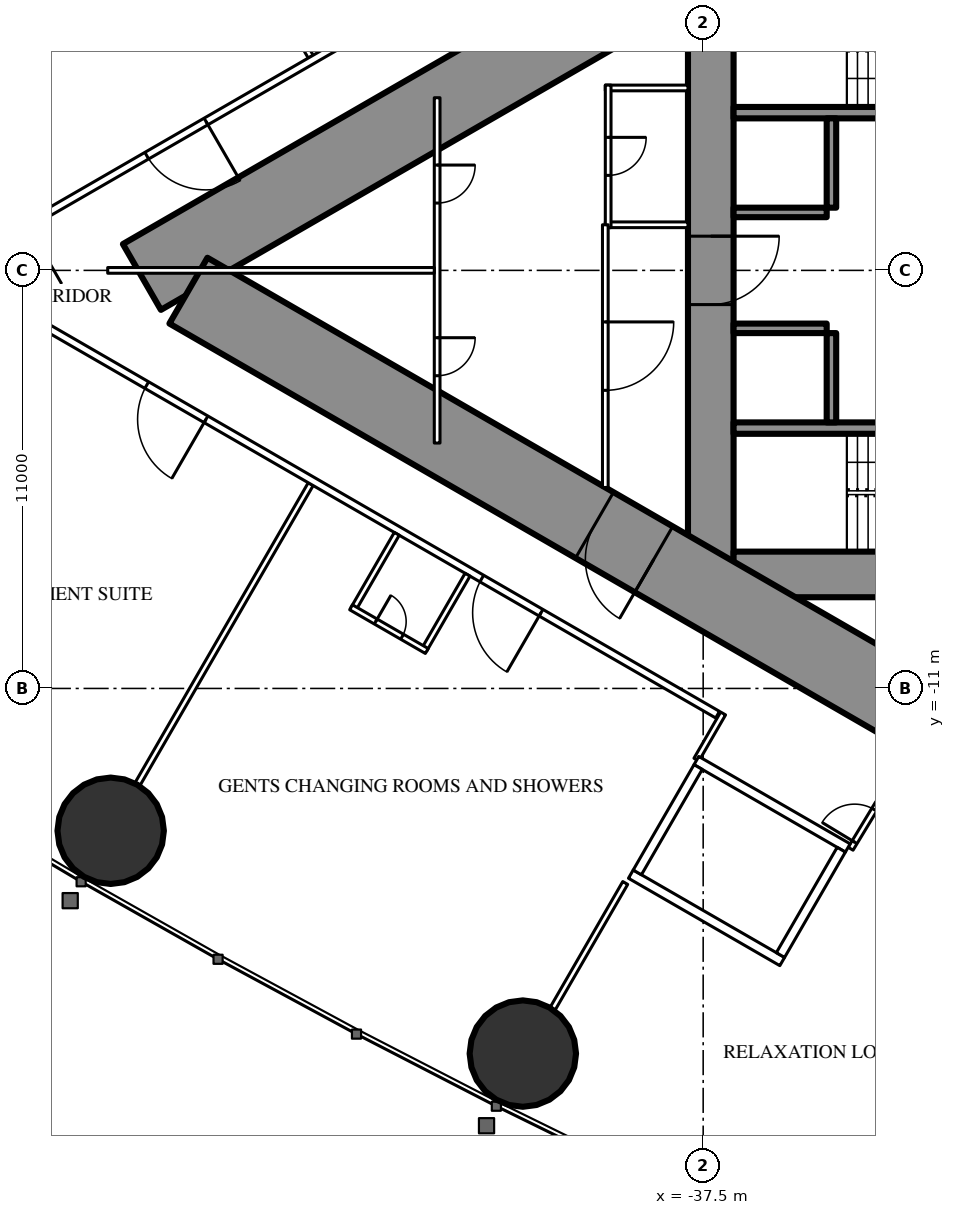
"""IFC4 building model, lengths in metres.
Left out: names, types, materials, properties, quantities, classifications, styles, units other than length and angle.
Written with IfcOpenShell. Run it as: python <this file> out.ifc"""

import sys

from ifc_helpers import new_model, si_unit, direction, frame, frame_2d, origin, origin_2d, place, context, subcontext, project, spatial, rectangle, hollow_circle, extrude, element, fill, save


model = new_model("IFC4")
c1 = context("Model", 3, precision=1e-05, world=origin(), true_north=direction((0.0, 1.0)))
c2 = subcontext(c1, "Body", "Model", "MODEL_VIEW")
j1 = project(units=[si_unit("LENGTHUNIT", "METRE"), si_unit("PLANEANGLEUNIT", "RADIAN")], contexts=[c1])
p1 = place(None, origin())
s1 = spatial("IfcSite", under=j1, at=p1, CompositionType="ELEMENT")
p2 = place(p1, origin())
s2 = spatial("IfcBuilding", under=s1, at=p2, CompositionType="ELEMENT")
p3 = place(p2, frame((0.0, 0.0, 12.6)))
s3 = spatial("IfcBuildingStorey", under=s2, at=p3, CompositionType="ELEMENT", Elevation=12.6)
for number, where, z_axis, x_axis in (
    (1, (-53.09, -14.745, 0.0), (0.0, 0.0, 1.0), (1.0, 0.0, 0.0)),
    (2, (-42.245, -20.607, 0.0), (0.0, 0.0, 1.0), (1.0, 0.0, 0.0)),
):
    element("IfcColumn", number, at=place(p3, frame(where, z_axis=z_axis, x_axis=x_axis)), inside=s3, PredefinedType="COLUMN", context=c2, shape_type="SweptSolid", body=[
        extrude(hollow_circle(Radius=1.4, WallThickness=0.12, at=origin_2d()), origin(), (0.0, 0.0, 1.0), 5.4),
    ])
p4 = place(p3, frame((-37.3, 8.6, 0.0), z_axis=(0.0, 0.0, 1.0), x_axis=(0.0, -1.0, 0.0)))
e3 = element("IfcWall", 3, at=p4, inside=s3, PredefinedType="SHEAR", context=c2, shape_type="SweptSolid", body=[
    extrude(rectangle(XDim=17.2, YDim=1.2, at=frame_2d((8.6, 0.0))), origin(), (0.0, 0.0, 1.0), 5.4),
])
p5 = place(p4, frame((7.7, 0.0, 0.0)))
e4 = element("IfcOpeningElement", 4, at=p5, cuts=e3, PredefinedType="OPENING", context=c2, shape_type="SweptSolid", body=[
    extrude(rectangle(XDim=1.8, YDim=2.2, at=frame_2d((0.9, 1.1))), frame((0.0, 0.61, 0.0), z_axis=(0.0, -1.0, 0.0), x_axis=(1.0, 0.0, 0.0)), (0.0, 0.0, 1.0), 1.22),
])
p6 = place(p3, frame((-28.3, -8.0, 0.0), z_axis=(0.0, 0.0, 1.0), x_axis=(-1.0, 0.0, 0.0)))
e5 = element("IfcWall", 5, at=p6, inside=s3, PredefinedType="SHEAR", context=c2, shape_type="SweptSolid", body=[
    extrude(rectangle(XDim=8.4, YDim=1.2, at=frame_2d((4.2, 0.0))), origin(), (0.0, 0.0, 1.0), 5.4),
])
p7 = place(p6, frame((0.25, 0.0, 0.0)))
e6 = element("IfcOpeningElement", 6, at=p7, cuts=e5, PredefinedType="OPENING", context=c2, shape_type="SweptSolid", body=[
    extrude(rectangle(XDim=1.0, YDim=2.2, at=frame_2d((0.5, 1.1))), frame((0.0, 0.61, 0.0), z_axis=(0.0, -1.0, 0.0), x_axis=(1.0, 0.0, 0.0)), (0.0, 0.0, 1.0), 1.22),
])
for number, where, z_axis, x_axis in (
    (7, (-28.3, 4.15, 0.0), (0.0, 0.0, 1.0), (-1.0, 0.0, 0.0)),
    (8, (-28.3, -4.15, 0.0), (0.0, 0.0, 1.0), (-1.0, 0.0, 0.0)),
):
    element("IfcWall", number, at=place(p3, frame(where, z_axis=z_axis, x_axis=x_axis)), inside=s3, PredefinedType="SHEAR", context=c2, shape_type="SweptSolid", body=[
        extrude(rectangle(XDim=8.4, YDim=0.3, at=frame_2d((4.2, 0.0))), origin(), (0.0, 0.0, 1.0), 5.4),
    ])
p8 = place(p3, frame((-34.125, 4.0, 0.0), z_axis=(0.0, 0.0, 1.0), x_axis=(0.0, -1.0, 0.0)))
e9 = element("IfcWall", 9, at=p8, inside=s3, PredefinedType="SHEAR", context=c2, shape_type="SweptSolid", body=[
    extrude(rectangle(XDim=2.35, YDim=0.25, at=frame_2d((1.175, 0.0))), origin(), (0.0, 0.0, 1.0), 5.4),
])
p9 = place(p3, frame((-34.25, 1.525, 0.0), z_axis=(0.0, 0.0, 1.0), x_axis=(-1.0, 0.0, 0.0)))
e10 = element("IfcWall", 10, at=p9, inside=s3, PredefinedType="SHEAR", context=c2, shape_type="SweptSolid", body=[
    extrude(rectangle(XDim=2.45, YDim=0.25, at=frame_2d((1.225, 0.0))), origin(), (0.0, 0.0, 1.0), 5.4),
])
p10 = place(p3, frame((-34.125, -1.65, 0.0), z_axis=(0.0, 0.0, 1.0), x_axis=(0.0, -1.0, 0.0)))
e11 = element("IfcWall", 11, at=p10, inside=s3, PredefinedType="SHEAR", context=c2, shape_type="SweptSolid", body=[
    extrude(rectangle(XDim=2.35, YDim=0.25, at=frame_2d((1.175, 0.0))), origin(), (0.0, 0.0, 1.0), 5.4),
])
p11 = place(p3, frame((-34.25, -1.525, 0.0), z_axis=(0.0, 0.0, 1.0), x_axis=(-1.0, 0.0, 0.0)))
e12 = element("IfcWall", 12, at=p11, inside=s3, PredefinedType="SHEAR", context=c2, shape_type="SweptSolid", body=[
    extrude(rectangle(XDim=2.45, YDim=0.25, at=frame_2d((1.225, 0.0))), origin(), (0.0, 0.0, 1.0), 5.4),
])
p12 = place(p3, frame((-27.2, 14.3, 0.0), z_axis=(0.0, 0.0, 1.0), x_axis=(-0.866026593062, -0.499997940104, 0.0)))
e13 = element("IfcWall", 13, at=p12, inside=s3, PredefinedType="SHEAR", context=c2, shape_type="SweptSolid", body=[
    extrude(rectangle(XDim=28.946, YDim=2.0, at=frame_2d((14.473, 0.0))), origin(), (0.0, 0.0, 1.0), 5.4),
])
p13 = place(p12, frame((4.6, 0.0, 0.0)))
e14 = element("IfcOpeningElement", 14, at=p13, cuts=e13, PredefinedType="OPENING", context=c2, shape_type="SweptSolid", body=[
    extrude(rectangle(XDim=1.0, YDim=2.2, at=frame_2d((0.5, 1.1))), frame((0.0, 1.01, 0.0), z_axis=(0.0, -1.0, 0.0), x_axis=(1.0, 0.0, 0.0)), (0.0, 0.0, 1.0), 2.02),
])
p14 = place(p12, frame((13.395, 0.0, 0.0)))
e15 = element("IfcOpeningElement", 15, at=p14, cuts=e13, PredefinedType="OPENING", context=c2, shape_type="SweptSolid", body=[
    extrude(rectangle(XDim=1.8, YDim=2.2, at=frame_2d((0.9, 1.1))), frame((0.0, 1.01, 0.0), z_axis=(0.0, -1.0, 0.0), x_axis=(1.0, 0.0, 0.0)), (0.0, 0.0, 1.0), 2.02),
])
p15 = place(p3, frame((-27.2, -14.3, 0.0), z_axis=(0.0, 0.0, 1.0), x_axis=(-0.866024044937, 0.500002353585, 0.0)))
e16 = element("IfcWall", 16, at=p15, inside=s3, PredefinedType="SHEAR", context=c2, shape_type="SweptSolid", body=[
    extrude(rectangle(XDim=27.533, YDim=2.0, at=frame_2d((13.767, 0.0))), origin(), (0.0, 0.0, 1.0), 5.4),
])
p16 = place(p15, frame((4.6, 0.0, 0.0)))
e17 = element("IfcOpeningElement", 17, at=p16, cuts=e16, PredefinedType="OPENING", context=c2, shape_type="SweptSolid", body=[
    extrude(rectangle(XDim=1.0, YDim=2.2, at=frame_2d((0.5, 1.1))), frame((0.0, 1.01, 0.0), z_axis=(0.0, -1.0, 0.0), x_axis=(1.0, 0.0, 0.0)), (0.0, 0.0, 1.0), 2.02),
])
p17 = place(p15, frame((13.395, 0.0, 0.0)))
e18 = element("IfcOpeningElement", 18, at=p17, cuts=e16, PredefinedType="OPENING", context=c2, shape_type="SweptSolid", body=[
    extrude(rectangle(XDim=1.8, YDim=2.2, at=frame_2d((0.9, 1.1))), frame((0.0, 1.01, 0.0), z_axis=(0.0, -1.0, 0.0), x_axis=(1.0, 0.0, 0.0)), (0.0, 0.0, 1.0), 2.02),
])
for number, where, z_axis, x_axis in (
    (19, (-47.827, 5.624, 0.0), (0.0, 0.0, 1.0), (-0.5, 0.866, 0.0)),
    (20, (-47.827, -5.624, 0.0), (0.0, 0.0, 1.0), (-0.5, -0.866, 0.0)),
):
    element("IfcWall", number, at=place(p3, frame(where, z_axis=z_axis, x_axis=x_axis)), inside=s3, PredefinedType="PARTITIONING", context=c2, shape_type="SweptSolid", body=[
        extrude(rectangle(XDim=9.11, YDim=0.15, at=frame_2d((4.555, 0.0))), origin(), (0.0, 0.0, 1.0), 4.15),
    ])
p18 = place(p3, frame((-39.551, -16.118, 0.0), z_axis=(0.0, 0.0, 1.0), x_axis=(-0.499986503906, -0.866033195618, 0.0)))
e21 = element("IfcWall", 21, at=p18, inside=s3, PredefinedType="PARTITIONING", context=c2, shape_type="SweptSolid", body=[
    extrude(rectangle(XDim=3.815, YDim=0.15, at=frame_2d((1.907, 0.0))), origin(), (0.0, 0.0, 1.0), 5.15),
])
p19 = place(p3, frame((-37.9, 11.24, 0.0), z_axis=(0.0, 0.0, 1.0), x_axis=(-0.866022995118, -0.50000417191, 0.0)))
e22 = element("IfcWall", 22, at=p19, inside=s3, PredefinedType="PARTITIONING", context=c2, shape_type="SweptSolid", body=[
    extrude(rectangle(XDim=22.48, YDim=0.2, at=frame_2d((11.24, 0.0))), origin(), (0.0, 0.0, 1.0), 4.25),
])
p20 = place(p19, frame((14.644, 0.0, 0.0)))
e23 = element("IfcOpeningElement", 23, at=p20, cuts=e22, PredefinedType="OPENING", context=c2, shape_type="SweptSolid", body=[
    extrude(rectangle(XDim=1.8, YDim=2.2, at=frame_2d((0.9, 1.1))), frame((0.0, 0.11, 0.0), z_axis=(0.0, -1.0, 0.0), x_axis=(1.0, 0.0, 0.0)), (0.0, 0.0, 1.0), 0.22),
])
p21 = place(p19, frame((20.069, 0.0, 0.0)))
e24 = element("IfcOpeningElement", 24, at=p21, cuts=e22, PredefinedType="OPENING", context=c2, shape_type="SweptSolid", body=[
    extrude(rectangle(XDim=1.8, YDim=2.2, at=frame_2d((0.9, 1.1))), frame((0.0, 0.11, 0.0), z_axis=(0.0, -1.0, 0.0), x_axis=(1.0, 0.0, 0.0)), (0.0, 0.0, 1.0), 0.22),
])
p22 = place(p19, frame((4.915, 0.0, 0.0)))
e25 = element("IfcOpeningElement", 25, at=p22, cuts=e22, PredefinedType="OPENING", context=c2, shape_type="SweptSolid", body=[
    extrude(rectangle(XDim=1.8, YDim=2.2, at=frame_2d((0.9, 1.1))), frame((0.0, 0.11, 0.0), z_axis=(0.0, -1.0, 0.0), x_axis=(1.0, 0.0, 0.0)), (0.0, 0.0, 1.0), 0.22),
])
p23 = place(p3, frame((-27.5, -17.244, 0.0), z_axis=(0.0, 0.0, 1.0), x_axis=(-0.866027347857, 0.499996632752, 0.0)))
e26 = element("IfcWall", 26, at=p23, inside=s3, PredefinedType="PARTITIONING", context=c2, shape_type="SweptSolid", body=[
    extrude(rectangle(XDim=6.269, YDim=0.2, at=frame_2d((3.135, 0.0))), origin(), (0.0, 0.0, 1.0), 4.25),
])
p24 = place(p3, frame((-37.12, -11.69, 0.0), z_axis=(0.0, 0.0, 1.0), x_axis=(-0.866028803602, 0.499994111297, 0.0)))
e27 = element("IfcWall", 27, at=p24, inside=s3, PredefinedType="PARTITIONING", context=c2, shape_type="SweptSolid", body=[
    extrude(rectangle(XDim=23.26, YDim=0.2, at=frame_2d((11.63, 0.0))), origin(), (0.0, 0.0, 1.0), 4.25),
])
p25 = place(p24, frame((20.909, 0.0, 0.0)))
e28 = element("IfcOpeningElement", 28, at=p25, cuts=e27, PredefinedType="OPENING", context=c2, shape_type="SweptSolid", body=[
    extrude(rectangle(XDim=1.8, YDim=2.2, at=frame_2d((0.9, 1.1))), frame((0.0, 0.11, 0.0), z_axis=(0.0, -1.0, 0.0), x_axis=(1.0, 0.0, 0.0)), (0.0, 0.0, 1.0), 0.22),
])
p26 = place(p24, frame((15.544, 0.0, 0.0)))
e29 = element("IfcOpeningElement", 29, at=p26, cuts=e27, PredefinedType="OPENING", context=c2, shape_type="SweptSolid", body=[
    extrude(rectangle(XDim=1.8, YDim=2.2, at=frame_2d((0.9, 1.1))), frame((0.0, 0.11, 0.0), z_axis=(0.0, -1.0, 0.0), x_axis=(1.0, 0.0, 0.0)), (0.0, 0.0, 1.0), 0.22),
])
p27 = place(p24, frame((5.365, 0.0, 0.0)))
e30 = element("IfcOpeningElement", 30, at=p27, cuts=e27, PredefinedType="OPENING", context=c2, shape_type="SweptSolid", body=[
    extrude(rectangle(XDim=1.8, YDim=2.2, at=frame_2d((0.9, 1.1))), frame((0.0, 0.11, 0.0), z_axis=(0.0, -1.0, 0.0), x_axis=(1.0, 0.0, 0.0)), (0.0, 0.0, 1.0), 0.22),
])
p28 = place(p3, frame((-36.976, -11.658, 0.0), z_axis=(0.0, 0.0, 1.0), x_axis=(-0.50008355685, -0.86597715684, 0.0)))
e31 = element("IfcWall", 31, at=p28, inside=s3, PredefinedType="PARTITIONING", context=c2, shape_type="SweptSolid", body=[
    extrude(rectangle(XDim=1.405, YDim=0.15, at=frame_2d((0.702, 0.0))), origin(), (0.0, 0.0, 1.0), 5.15),
])
p29 = place(p3, frame((-33.621, -15.218, 0.0), z_axis=(0.0, 0.0, 1.0), x_axis=(0.518424923641, 0.855123148177, 0.0)))
e32 = element("IfcWall", 32, at=p29, inside=s3, PredefinedType="PARTITIONING", context=c2, shape_type="SweptSolid", body=[
    extrude(rectangle(XDim=1.405, YDim=0.15, at=frame_2d((0.703, 0.0))), origin(), (0.0, 0.0, 1.0), 5.15),
])
p30 = place(p29, frame((0.203, 0.0, 0.0)))
e33 = element("IfcOpeningElement", 33, at=p30, cuts=e32, PredefinedType="OPENING", context=c2, shape_type="SweptSolid", body=[
    extrude(rectangle(XDim=1.0, YDim=2.2, at=frame_2d((0.5, 1.1))), frame((0.0, 0.085, 0.0), z_axis=(0.0, -1.0, 0.0), x_axis=(1.0, 0.0, 0.0)), (0.0, 0.0, 1.0), 0.17),
])
for number, where, z_axis, x_axis in (
    (34, (-37.9, 1.2, 0.0), (0.0, 0.0, 1.0), (-1.0, 0.0, 0.0)),
    (35, (-37.9, 4.8, 0.0), (0.0, 0.0, 1.0), (-1.0, 0.0, 0.0)),
):
    element("IfcWall", number, at=place(p3, frame(where, z_axis=z_axis, x_axis=x_axis)), inside=s3, PredefinedType="PARTITIONING", context=c2, shape_type="SweptSolid", body=[
        extrude(rectangle(XDim=2.175, YDim=0.15, at=frame_2d((1.087, 0.0))), origin(), (0.0, 0.0, 1.0), 5.15),
    ])
p31 = place(p3, frame((-40.0, 4.875, 0.0), z_axis=(0.0, 0.0, 1.0), x_axis=(0.0, -1.0, 0.0)))
e36 = element("IfcWall", 36, at=p31, inside=s3, PredefinedType="PARTITIONING", context=c2, shape_type="SweptSolid", body=[
    extrude(rectangle(XDim=3.75, YDim=0.15, at=frame_2d((1.875, 0.0))), origin(), (0.0, 0.0, 1.0), 5.15),
])
p32 = place(p31, frame((1.375, 0.0, 0.0)))
e37 = element("IfcOpeningElement", 37, at=p32, cuts=e36, PredefinedType="OPENING", context=c2, shape_type="SweptSolid", body=[
    extrude(rectangle(XDim=1.0, YDim=2.2, at=frame_2d((0.5, 1.1))), frame((0.0, 0.085, 0.0), z_axis=(0.0, -1.0, 0.0), x_axis=(1.0, 0.0, 0.0)), (0.0, 0.0, 1.0), 0.17),
])
p33 = place(p3, frame((-40.075, 1.2, 0.0), z_axis=(0.0, 0.0, 1.0), x_axis=(0.0, -1.0, 0.0)))
e38 = element("IfcWall", 38, at=p33, inside=s3, PredefinedType="PARTITIONING", context=c2, shape_type="SweptSolid", body=[
    extrude(rectangle(XDim=6.912, YDim=0.15, at=frame_2d((3.456, 0.0))), origin(), (0.0, 0.0, 1.0), 5.15),
])
p34 = place(p33, frame((2.556, 0.0, 0.0)))
e39 = element("IfcOpeningElement", 39, at=p34, cuts=e38, PredefinedType="OPENING", context=c2, shape_type="SweptSolid", body=[
    extrude(rectangle(XDim=1.8, YDim=2.2, at=frame_2d((0.9, 1.1))), frame((0.0, 0.085, 0.0), z_axis=(0.0, -1.0, 0.0), x_axis=(1.0, 0.0, 0.0)), (0.0, 0.0, 1.0), 0.17),
])
p35 = place(p3, frame((-44.5, 4.543, 0.0), z_axis=(0.0, 0.0, 1.0), x_axis=(0.0, -1.0, 0.0)))
e40 = element("IfcWall", 40, at=p35, inside=s3, PredefinedType="PARTITIONING", context=c2, shape_type="SweptSolid", body=[
    extrude(rectangle(XDim=9.085, YDim=0.15, at=frame_2d((4.543, 0.0))), origin(), (0.0, 0.0, 1.0), 5.15),
])
p36 = place(p35, frame((1.771, 0.0, 0.0)))
e41 = element("IfcOpeningElement", 41, at=p36, cuts=e40, PredefinedType="OPENING", context=c2, shape_type="SweptSolid", body=[
    extrude(rectangle(XDim=1.0, YDim=2.2, at=frame_2d((0.5, 1.1))), frame((0.0, 0.085, 0.0), z_axis=(0.0, -1.0, 0.0), x_axis=(1.0, 0.0, 0.0)), (0.0, 0.0, 1.0), 0.17),
])
p37 = place(p35, frame((6.314, 0.0, 0.0)))
e42 = element("IfcOpeningElement", 42, at=p37, cuts=e40, PredefinedType="OPENING", context=c2, shape_type="SweptSolid", body=[
    extrude(rectangle(XDim=1.0, YDim=2.2, at=frame_2d((0.5, 1.1))), frame((0.0, 0.085, 0.0), z_axis=(0.0, -1.0, 0.0), x_axis=(1.0, 0.0, 0.0)), (0.0, 0.0, 1.0), 0.17),
])
p38 = place(p3, frame((-44.575, 0.0, 0.0), z_axis=(0.0, 0.0, 1.0), x_axis=(-1.0, 0.0, 0.0)))
e43 = element("IfcWall", 43, at=p38, inside=s3, PredefinedType="PARTITIONING", context=c2, shape_type="SweptSolid", body=[
    extrude(rectangle(XDim=8.593, YDim=0.15, at=frame_2d((4.297, 0.0))), origin(), (0.0, 0.0, 1.0), 4.15),
])
for number, where, z_axis, x_axis in (
    (44, (-43.7, -8.007, 0.0), (0.0, 0.0, 1.0), (-0.5, -0.866, 0.0)),
    (45, (-45.562, -6.932, 0.0), (0.0, 0.0, 1.0), (-0.5, -0.866, 0.0)),
):
    element("IfcWall", number, at=place(p3, frame(where, z_axis=z_axis, x_axis=x_axis)), inside=s3, PredefinedType="PARTITIONING", context=c2, shape_type="SweptSolid", body=[
        extrude(rectangle(XDim=2.275, YDim=0.15, at=frame_2d((1.137, 0.0))), origin(), (0.0, 0.0, 1.0), 5.15),
    ])
p39 = place(p3, frame((-44.773, -10.014, 0.0), z_axis=(0.0, 0.0, 1.0), x_axis=(-0.86602648383, 0.499998129301, 0.0)))
e46 = element("IfcWall", 46, at=p39, inside=s3, PredefinedType="PARTITIONING", context=c2, shape_type="SweptSolid", body=[
    extrude(rectangle(XDim=2.3, YDim=0.15, at=frame_2d((1.15, 0.0))), origin(), (0.0, 0.0, 1.0), 5.15),
])
p40 = place(p39, frame((0.75, 0.0, 0.0)))
e47 = element("IfcOpeningElement", 47, at=p40, cuts=e46, PredefinedType="OPENING", context=c2, shape_type="SweptSolid", body=[
    extrude(rectangle(XDim=0.8, YDim=2.2, at=frame_2d((0.4, 1.1))), frame((0.0, 0.085, 0.0), z_axis=(0.0, -1.0, 0.0), x_axis=(1.0, 0.0, 0.0)), (0.0, 0.0, 1.0), 0.17),
])
p41 = place(p3, frame((-33.696, -15.197, 0.0), z_axis=(0.0, 0.0, 1.0), x_axis=(-0.865976953817, 0.500083908417, 0.0)))
e48 = element("IfcWall", 48, at=p41, inside=s3, PredefinedType="PARTITIONING", context=c2, shape_type="SweptSolid", body=[
    extrude(rectangle(XDim=4.599, YDim=0.25, at=frame_2d((2.3, 0.0))), origin(), (0.0, 0.0, 1.0), 5.15),
])
p42 = place(p3, frame((-35.42, -18.186, 0.0), z_axis=(0.0, 0.0, 1.0), x_axis=(-0.865990227814, 0.50006092162, 0.0)))
e49 = element("IfcWall", 49, at=p42, inside=s3, PredefinedType="PARTITIONING", context=c2, shape_type="SweptSolid", body=[
    extrude(rectangle(XDim=4.6, YDim=0.25, at=frame_2d((2.3, 0.0))), origin(), (0.0, 0.0, 1.0), 5.15),
])
p43 = place(p3, frame((-33.866, -15.243, 0.0), z_axis=(0.0, 0.0, 1.0), x_axis=(-0.499929347863, -0.866066190972, 0.0)))
e50 = element("IfcWall", 50, at=p43, inside=s3, PredefinedType="PARTITIONING", context=c2, shape_type="SweptSolid", body=[
    extrude(rectangle(XDim=3.201, YDim=0.25, at=frame_2d((1.6, 0.0))), origin(), (0.0, 0.0, 1.0), 5.15),
])
p44 = place(p3, frame((-37.633, -13.068, 0.0), z_axis=(0.0, 0.0, 1.0), x_axis=(-0.499872130319, -0.866099216793, 0.0)))
e51 = element("IfcWall", 51, at=p44, inside=s3, PredefinedType="PARTITIONING", context=c2, shape_type="SweptSolid", body=[
    extrude(rectangle(XDim=3.2, YDim=0.25, at=frame_2d((1.6, 0.0))), origin(), (0.0, 0.0, 1.0), 5.15),
])
p45 = place(p20, origin())
e52 = element("IfcDoor", 52, at=p45, inside=s3, OperationType="DOUBLE_DOOR_SINGLE_SWING", PredefinedType="DOOR", context=c2, shape_type="SweptSolid", body=[
    extrude(rectangle(XDim=1.8, YDim=2.2, at=frame_2d((0.9, 1.1))), frame((0.0, 0.025, 0.0), z_axis=(0.0, -1.0, 0.0), x_axis=(1.0, 0.0, 0.0)), (0.0, 0.0, 1.0), 0.05),
])
fill(e23, e52)
p46 = place(p26, origin())
e53 = element("IfcDoor", 53, at=p46, inside=s3, OperationType="DOUBLE_DOOR_SINGLE_SWING", PredefinedType="DOOR", context=c2, shape_type="SweptSolid", body=[
    extrude(rectangle(XDim=1.8, YDim=2.2, at=frame_2d((0.9, 1.1))), frame((0.0, 0.025, 0.0), z_axis=(0.0, -1.0, 0.0), x_axis=(1.0, 0.0, 0.0)), (0.0, 0.0, 1.0), 0.05),
])
fill(e29, e53)
p47 = place(p27, origin())
e54 = element("IfcDoor", 54, at=p47, inside=s3, OperationType="DOUBLE_DOOR_SINGLE_SWING", PredefinedType="DOOR", context=c2, shape_type="SweptSolid", body=[
    extrude(rectangle(XDim=1.8, YDim=2.2, at=frame_2d((0.9, 1.1))), frame((0.0, 0.025, 0.0), z_axis=(0.0, -1.0, 0.0), x_axis=(1.0, 0.0, 0.0)), (0.0, 0.0, 1.0), 0.05),
])
fill(e30, e54)
p48 = place(p30, origin())
e55 = element("IfcDoor", 55, at=p48, inside=s3, OperationType="SINGLE_SWING_LEFT", PredefinedType="DOOR", context=c2, shape_type="SweptSolid", body=[
    extrude(rectangle(XDim=1.0, YDim=2.2, at=frame_2d((0.5, 1.1))), frame((0.0, 0.025, 0.0), z_axis=(0.0, -1.0, 0.0), x_axis=(1.0, 0.0, 0.0)), (0.0, 0.0, 1.0), 0.05),
])
fill(e33, e55)
p49 = place(p32, origin())
e56 = element("IfcDoor", 56, at=p49, inside=s3, OperationType="SINGLE_SWING_LEFT", PredefinedType="DOOR", context=c2, shape_type="SweptSolid", body=[
    extrude(rectangle(XDim=1.0, YDim=2.2, at=frame_2d((0.5, 1.1))), frame((0.0, 0.025, 0.0), z_axis=(0.0, -1.0, 0.0), x_axis=(1.0, 0.0, 0.0)), (0.0, 0.0, 1.0), 0.05),
])
fill(e37, e56)
p50 = place(p34, origin())
e57 = element("IfcDoor", 57, at=p50, inside=s3, OperationType="DOUBLE_DOOR_SINGLE_SWING", PredefinedType="DOOR", context=c2, shape_type="SweptSolid", body=[
    extrude(rectangle(XDim=1.8, YDim=2.2, at=frame_2d((0.9, 1.1))), frame((0.0, 0.025, 0.0), z_axis=(0.0, -1.0, 0.0), x_axis=(1.0, 0.0, 0.0)), (0.0, 0.0, 1.0), 0.05),
])
fill(e39, e57)
p51 = place(p36, origin())
e58 = element("IfcDoor", 58, at=p51, inside=s3, OperationType="SINGLE_SWING_LEFT", PredefinedType="DOOR", context=c2, shape_type="SweptSolid", body=[
    extrude(rectangle(XDim=1.0, YDim=2.2, at=frame_2d((0.5, 1.1))), frame((0.0, 0.025, 0.0), z_axis=(0.0, -1.0, 0.0), x_axis=(1.0, 0.0, 0.0)), (0.0, 0.0, 1.0), 0.05),
])
fill(e41, e58)
p52 = place(p37, origin())
e59 = element("IfcDoor", 59, at=p52, inside=s3, OperationType="SINGLE_SWING_LEFT", PredefinedType="DOOR", context=c2, shape_type="SweptSolid", body=[
    extrude(rectangle(XDim=1.0, YDim=2.2, at=frame_2d((0.5, 1.1))), frame((0.0, 0.025, 0.0), z_axis=(0.0, -1.0, 0.0), x_axis=(1.0, 0.0, 0.0)), (0.0, 0.0, 1.0), 0.05),
])
fill(e42, e59)
p53 = place(p17, origin())
e60 = element("IfcDoor", 60, at=p53, inside=s3, OperationType="DOUBLE_DOOR_SINGLE_SWING", PredefinedType="DOOR", context=c2, shape_type="SweptSolid", body=[
    extrude(rectangle(XDim=1.8, YDim=2.2, at=frame_2d((0.9, 1.1))), frame((0.0, 0.025, 0.0), z_axis=(0.0, -1.0, 0.0), x_axis=(1.0, 0.0, 0.0)), (0.0, 0.0, 1.0), 0.05),
])
fill(e18, e60)
p54 = place(p5, origin())
e61 = element("IfcDoor", 61, at=p54, inside=s3, OperationType="DOUBLE_DOOR_SINGLE_SWING", PredefinedType="DOOR", context=c2, shape_type="SweptSolid", body=[
    extrude(rectangle(XDim=1.8, YDim=2.2, at=frame_2d((0.9, 1.1))), frame((0.0, 0.025, 0.0), z_axis=(0.0, -1.0, 0.0), x_axis=(1.0, 0.0, 0.0)), (0.0, 0.0, 1.0), 0.05),
])
fill(e4, e61)
p55 = place(p40, origin())
e62 = element("IfcDoor", 62, at=p55, inside=s3, OperationType="SINGLE_SWING_RIGHT", PredefinedType="DOOR", context=c2, shape_type="SweptSolid", body=[
    extrude(rectangle(XDim=0.8, YDim=2.2, at=frame_2d((0.4, 1.1))), frame((0.0, 0.025, 0.0), z_axis=(0.0, -1.0, 0.0), x_axis=(1.0, 0.0, 0.0)), (0.0, 0.0, 1.0), 0.05),
])
fill(e47, e62)
save(model, sys.argv[1])
